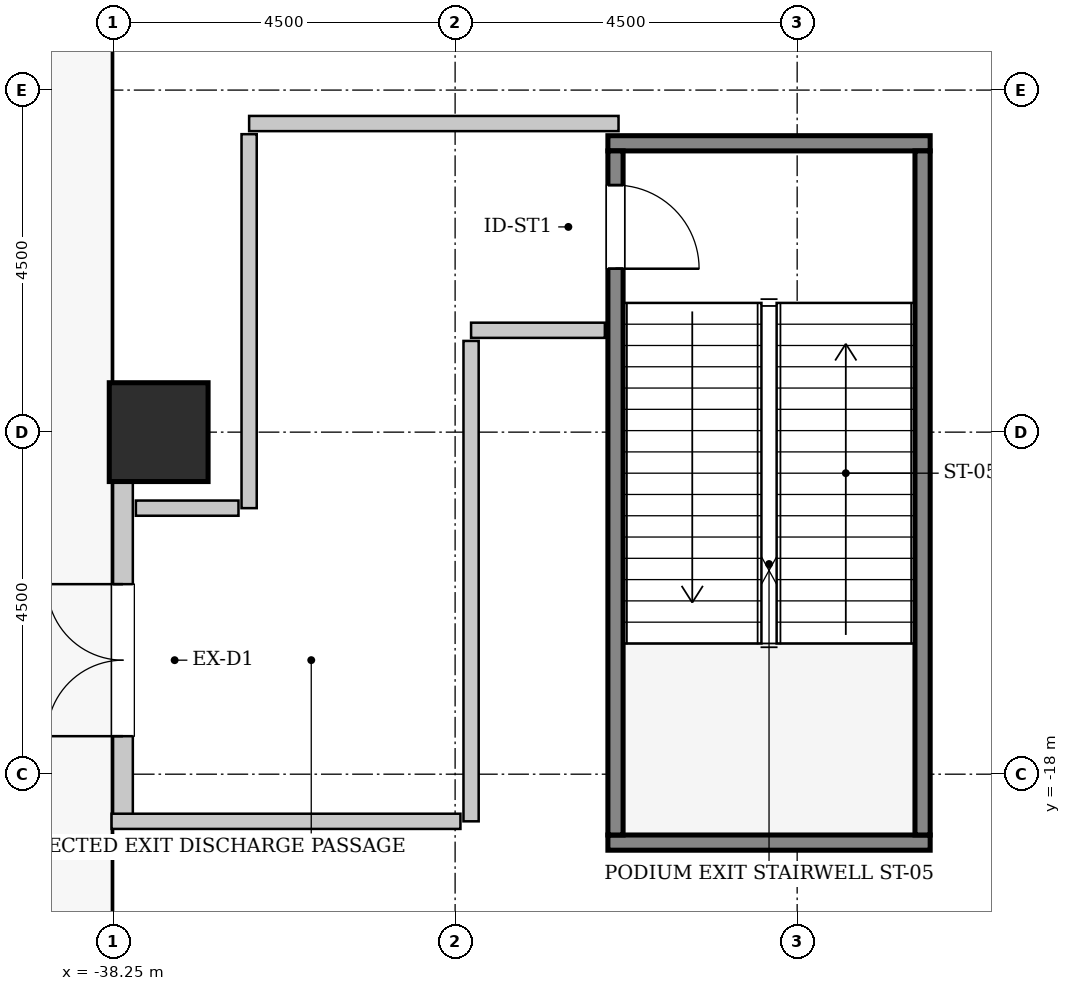
"""IFC4 building model, lengths in metres.
Left out: names, types, materials, properties, quantities, classifications, styles, units other than length and angle.
Written with IfcOpenShell. Run it as: python <this file> out.ifc"""

import sys

from ifc_helpers import new_model, si_unit, direction, frame, frame_2d, origin, origin_2d, place, context, subcontext, project, spatial, rectangle, hollow_rectangle, extrude, source, transform, mapped, element, fill, save


model = new_model("IFC4")
c1 = context("Model", 3, precision=1e-05, world=origin(), true_north=direction((0.0, 1.0)))
c2 = subcontext(c1, "Body", "Model", "MODEL_VIEW")
j1 = project(units=[si_unit("LENGTHUNIT", "METRE"), si_unit("PLANEANGLEUNIT", "RADIAN")], contexts=[c1])
p1 = place(None, origin())
s1 = spatial("IfcSite", under=j1, at=p1, CompositionType="ELEMENT")
p2 = place(p1, origin())
s2 = spatial("IfcBuilding", under=s1, at=p2, CompositionType="ELEMENT")
p3 = place(p2, origin())
s3 = spatial("IfcBuildingStorey", under=s2, at=p3, CompositionType="ELEMENT", Elevation=0.0)
m1 = source(origin(), c2, "Body", "SweptSolid", [
    extrude(hollow_rectangle(XDim=1.3, YDim=1.3, WallThickness=0.065, InnerFilletRadius=0.065, OuterFilletRadius=0.13, at=origin_2d()), origin(), (0.0, 0.0, 1.0), 6.0),
])
p4 = place(p3, frame((-37.65, -13.5, 0.0), z_axis=(0.0, 0.0, 1.0), x_axis=(1.0, 0.0, 0.0)))
e1 = element("IfcColumn", 1, at=p4, inside=s3, PredefinedType="COLUMN", context=c2, shape_type="MappedRepresentation", body=[
    mapped(m1, transform((0.0, 0.0, 0.0), x_axis=(1.0, 0.0, 0.0), y_axis=(0.0, 1.0, 0.0), z_axis=(0.0, 0.0, 1.0), scale=1.0)),
])
m2 = source(origin(), c2, "Body", "SweptSolid", [
    extrude(rectangle(XDim=4.41, YDim=0.26, at=frame_2d((2.205, 0.0))), origin(), (0.0, 0.0, 1.0), 5.7),
])
p5 = place(p3, frame((-38.12, -18.54, 0.0), z_axis=(0.0, 0.0, 1.0), x_axis=(0.0, 1.0, 0.0)))
e2 = element("IfcWall", 2, at=p5, inside=s3, PredefinedType="SOLIDWALL", context=c2, shape_type="MappedRepresentation", body=[
    mapped(m2, transform((0.0, 0.0, 0.0), x_axis=(1.0, 0.0, 0.0), y_axis=(0.0, 1.0, 0.0), z_axis=(0.0, 0.0, 1.0), scale=1.0)),
])
p6 = place(p5, frame((1.04, 0.0, 0.0)))
e3 = element("IfcOpeningElement", 3, at=p6, cuts=e2, PredefinedType="OPENING", context=c2, shape_type="SweptSolid", body=[
    extrude(rectangle(XDim=2.0, YDim=2.4, at=frame_2d((1.0, 1.2))), frame((0.0, 0.14, 0.0), z_axis=(0.0, -1.0, 0.0), x_axis=(1.0, 0.0, 0.0)), (0.0, 0.0, 1.0), 0.28),
])
m3 = source(origin(), c2, "Body", "SweptSolid", [
    extrude(rectangle(XDim=4.24, YDim=0.2, at=frame_2d((2.12, 0.0))), origin(), (0.0, 0.0, 1.0), 6.0),
])
for number, where, z_axis, x_axis in (
    (4, (-31.74, -9.7, 0.0), (0.0, 0.0, 1.0), (1.0, 0.0, 0.0)),
    (5, (-31.74, -18.9, 0.0), (0.0, 0.0, 1.0), (1.0, 0.0, 0.0)),
):
    element("IfcWall", number, at=place(p3, frame(where, z_axis=z_axis, x_axis=x_axis)), inside=s3, PredefinedType="SOLIDWALL", context=c2, shape_type="MappedRepresentation", body=[
        mapped(m3, transform((0.0, 0.0, 0.0), x_axis=(1.0, 0.0, 0.0), y_axis=(0.0, 1.0, 0.0), z_axis=(0.0, 0.0, 1.0), scale=1.0)),
    ])
m4 = source(origin(), c2, "Body", "SweptSolid", [
    extrude(rectangle(XDim=9.0, YDim=0.2, at=frame_2d((4.5, 0.0))), origin(), (0.0, 0.0, 1.0), 6.0),
])
p7 = place(p3, frame((-31.64, -9.8, 0.0), z_axis=(0.0, 0.0, 1.0), x_axis=(0.0, -1.0, 0.0)))
e6 = element("IfcWall", 6, at=p7, inside=s3, PredefinedType="SOLIDWALL", context=c2, shape_type="MappedRepresentation", body=[
    mapped(m4, transform((0.0, 0.0, 0.0), x_axis=(1.0, 0.0, 0.0), y_axis=(0.0, 1.0, 0.0), z_axis=(0.0, 0.0, 1.0), scale=1.0)),
])
p8 = place(p7, frame((0.45, 0.0, 0.0)))
e7 = element("IfcOpeningElement", 7, at=p8, cuts=e6, PredefinedType="OPENING", context=c2, shape_type="SweptSolid", body=[
    extrude(rectangle(XDim=1.1, YDim=2.15, at=frame_2d((0.55, 1.075))), frame((0.0, 0.11, 0.0), z_axis=(0.0, -1.0, 0.0), x_axis=(1.0, 0.0, 0.0)), (0.0, 0.0, 1.0), 0.22),
])
p9 = place(p3, frame((-27.6, -9.8, 0.0), z_axis=(0.0, 0.0, 1.0), x_axis=(0.0, -1.0, 0.0)))
e8 = element("IfcWall", 8, at=p9, inside=s3, PredefinedType="SOLIDWALL", context=c2, shape_type="MappedRepresentation", body=[
    mapped(m4, transform((0.0, 0.0, 0.0), x_axis=(1.0, 0.0, 0.0), y_axis=(0.0, 1.0, 0.0), z_axis=(0.0, 0.0, 1.0), scale=1.0)),
])
m5 = source(origin(), c2, "Body", "SweptSolid", [
    extrude(rectangle(XDim=4.86, YDim=0.2, at=frame_2d((2.43, 0.0))), origin(), (0.0, 0.0, 1.0), 5.685),
])
p10 = place(p3, frame((-36.46, -9.44, 0.0), z_axis=(0.0, 0.0, 1.0), x_axis=(1.0, 0.0, 0.0)))
e9 = element("IfcWall", 9, at=p10, inside=s3, PredefinedType="PARTITIONING", context=c2, shape_type="MappedRepresentation", body=[
    mapped(m5, transform((0.0, 0.0, 0.0), x_axis=(1.0, 0.0, 0.0), y_axis=(0.0, 1.0, 0.0), z_axis=(0.0, 0.0, 1.0), scale=1.0)),
])
m6 = source(origin(), c2, "Body", "SweptSolid", [
    extrude(rectangle(XDim=1.76, YDim=0.2, at=frame_2d((0.88, 0.0))), origin(), (0.0, 0.0, 1.0), 5.685),
])
p11 = place(p3, frame((-33.54, -12.16, 0.0), z_axis=(0.0, 0.0, 1.0), x_axis=(1.0, 0.0, 0.0)))
e10 = element("IfcWall", 10, at=p11, inside=s3, PredefinedType="PARTITIONING", context=c2, shape_type="MappedRepresentation", body=[
    mapped(m6, transform((0.0, 0.0, 0.0), x_axis=(1.0, 0.0, 0.0), y_axis=(0.0, 1.0, 0.0), z_axis=(0.0, 0.0, 1.0), scale=1.0)),
])
m7 = source(origin(), c2, "Body", "SweptSolid", [
    extrude(rectangle(XDim=6.32, YDim=0.2, at=frame_2d((3.16, 0.0))), origin(), (0.0, 0.0, 1.0), 5.685),
])
p12 = place(p3, frame((-33.54, -18.62, 0.0), z_axis=(0.0, 0.0, 1.0), x_axis=(0.0, 1.0, 0.0)))
e11 = element("IfcWall", 11, at=p12, inside=s3, PredefinedType="PARTITIONING", context=c2, shape_type="MappedRepresentation", body=[
    mapped(m7, transform((0.0, 0.0, 0.0), x_axis=(1.0, 0.0, 0.0), y_axis=(0.0, 1.0, 0.0), z_axis=(0.0, 0.0, 1.0), scale=1.0)),
])
m8 = source(origin(), c2, "Body", "SweptSolid", [
    extrude(rectangle(XDim=4.59, YDim=0.2, at=frame_2d((2.295, 0.0))), origin(), (0.0, 0.0, 1.0), 5.685),
])
p13 = place(p3, frame((-38.27, -18.62, 0.0), z_axis=(0.0, 0.0, 1.0), x_axis=(1.0, 0.0, 0.0)))
e12 = element("IfcWall", 12, at=p13, inside=s3, PredefinedType="PARTITIONING", context=c2, shape_type="MappedRepresentation", body=[
    mapped(m8, transform((0.0, 0.0, 0.0), x_axis=(1.0, 0.0, 0.0), y_axis=(0.0, 1.0, 0.0), z_axis=(0.0, 0.0, 1.0), scale=1.0)),
])
m9 = source(origin(), c2, "Body", "SweptSolid", [
    extrude(rectangle(XDim=4.92, YDim=0.2, at=frame_2d((2.46, 0.0))), origin(), (0.0, 0.0, 1.0), 5.685),
])
p14 = place(p3, frame((-36.46, -14.5, 0.0), z_axis=(0.0, 0.0, 1.0), x_axis=(0.0, 1.0, 0.0)))
e13 = element("IfcWall", 13, at=p14, inside=s3, PredefinedType="PARTITIONING", context=c2, shape_type="MappedRepresentation", body=[
    mapped(m9, transform((0.0, 0.0, 0.0), x_axis=(1.0, 0.0, 0.0), y_axis=(0.0, 1.0, 0.0), z_axis=(0.0, 0.0, 1.0), scale=1.0)),
])
m10 = source(origin(), c2, "Body", "SweptSolid", [
    extrude(rectangle(XDim=1.35, YDim=0.2, at=frame_2d((0.675, 0.0))), origin(), (0.0, 0.0, 1.0), 5.685),
])
p15 = place(p3, frame((-37.95, -14.5, 0.0), z_axis=(0.0, 0.0, 1.0), x_axis=(1.0, 0.0, 0.0)))
e14 = element("IfcWall", 14, at=p15, inside=s3, PredefinedType="PARTITIONING", context=c2, shape_type="MappedRepresentation", body=[
    mapped(m10, transform((0.0, 0.0, 0.0), x_axis=(1.0, 0.0, 0.0), y_axis=(0.0, 1.0, 0.0), z_axis=(0.0, 0.0, 1.0), scale=1.0)),
])
m11 = source(origin(), c2, "Body", "SweptSolid", [
    extrude(rectangle(XDim=2.0, YDim=2.4, at=frame_2d((1.0, 1.2))), frame((0.0, 0.025, 0.0), z_axis=(0.0, -1.0, 0.0), x_axis=(1.0, 0.0, 0.0)), (0.0, 0.0, 1.0), 0.05),
])
p16 = place(p6, origin())
e15 = element("IfcDoor", 15, at=p16, inside=s3, OperationType="DOUBLE_DOOR_SINGLE_SWING", PredefinedType="DOOR", context=c2, shape_type="MappedRepresentation", body=[
    mapped(m11, transform((0.0, 0.0, 0.0), x_axis=(1.0, 0.0, 0.0), y_axis=(0.0, 1.0, 0.0), z_axis=(0.0, 0.0, 1.0), scale=1.0)),
])
fill(e3, e15)
m12 = source(origin(), c2, "Body", "SweptSolid", [
    extrude(rectangle(XDim=1.1, YDim=2.15, at=frame_2d((0.55, 1.075))), frame((0.0, 0.025, 0.0), z_axis=(0.0, -1.0, 0.0), x_axis=(1.0, 0.0, 0.0)), (0.0, 0.0, 1.0), 0.05),
])
p17 = place(p8, frame((1.1, 0.0, 0.0), z_axis=(0.0, 0.0, 1.0), x_axis=(-1.0, 0.0, 0.0)))
e16 = element("IfcDoor", 16, at=p17, inside=s3, OperationType="SINGLE_SWING_RIGHT", PredefinedType="DOOR", context=c2, shape_type="MappedRepresentation", body=[
    mapped(m12, transform((0.0, 0.0, 0.0), x_axis=(1.0, 0.0, 0.0), y_axis=(0.0, 1.0, 0.0), z_axis=(0.0, 0.0, 1.0), scale=1.0)),
])
fill(e7, e16)
save(model, sys.argv[1])
